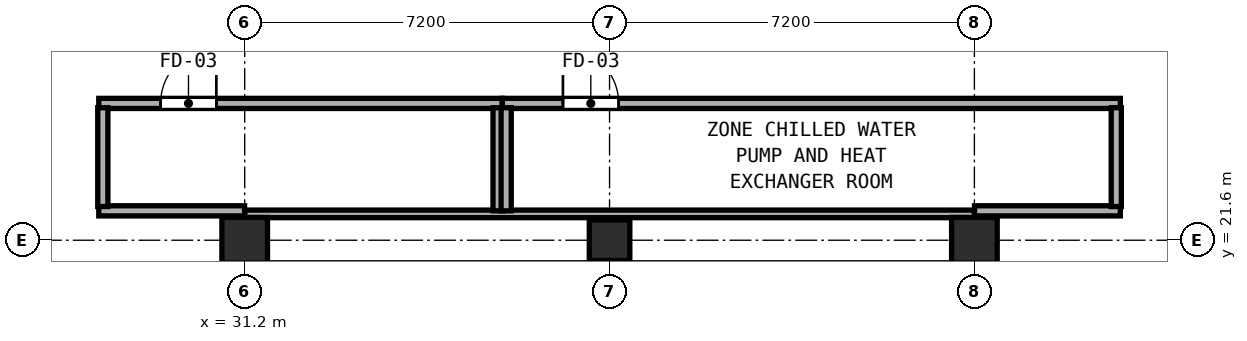
"""IFC4 building model, lengths in metres.
Left out: names, types, materials, properties, quantities, classifications, styles, units other than length and angle.
Written with IfcOpenShell. Run it as: python <this file> out.ifc"""

import sys

from ifc_helpers import new_model, si_unit, direction, frame, frame_2d, origin, origin_2d, place, context, subcontext, project, spatial, rectangle, hollow_rectangle, extrude, element, fill, save


model = new_model("IFC4")
c1 = context("Model", 3, precision=1e-05, world=origin(), true_north=direction((0.0, 1.0)))
c2 = subcontext(c1, "Body", "Model", "MODEL_VIEW")
j1 = project(units=[si_unit("LENGTHUNIT", "METRE"), si_unit("PLANEANGLEUNIT", "RADIAN")], contexts=[c1])
p1 = place(None, origin())
s1 = spatial("IfcSite", under=j1, at=p1, CompositionType="ELEMENT")
p2 = place(p1, origin())
s2 = spatial("IfcBuilding", under=s1, at=p2, CompositionType="ELEMENT")
p3 = place(p2, frame((0.0, 0.0, 230.6)))
s3 = spatial("IfcBuildingStorey", under=s2, at=p3, CompositionType="ELEMENT", Elevation=230.6)
for number, where, z_axis, x_axis in (
    (1, (31.2, 21.6, 0.0), (0.0, 0.0, 1.0), (1.0, 0.0, 0.0)),
    (2, (45.6, 21.6, 0.0), (0.0, 0.0, 1.0), (1.0, 0.0, 0.0)),
):
    element("IfcColumn", number, at=place(p3, frame(where, z_axis=z_axis, x_axis=x_axis)), inside=s3, PredefinedType="COLUMN", context=c2, shape_type="SweptSolid", body=[
        extrude(hollow_rectangle(XDim=0.9, YDim=0.9, WallThickness=0.034, at=origin_2d()), origin(), (0.0, 0.0, 1.0), 4.6),
    ])
p4 = place(p3, frame((38.4, 21.6, 0.0), z_axis=(0.0, 0.0, 1.0), x_axis=(1.0, 0.0, 0.0)))
e3 = element("IfcColumn", 3, at=p4, inside=s3, PredefinedType="COLUMN", context=c2, shape_type="SweptSolid", body=[
    extrude(hollow_rectangle(XDim=0.8, YDim=0.8, WallThickness=0.03, at=origin_2d()), origin(), (0.0, 0.0, 1.0), 4.6),
])
p5 = place(p3, frame((47.987, 20.51, 0.0), z_axis=(0.0, 0.0, 1.0), x_axis=(0.970145687294, 0.242522876086, 0.0)))
e4 = element("IfcWall", 4, at=p5, inside=s3, PredefinedType="PARAPET", context=c2, shape_type="SweptSolid", body=[
    extrude(rectangle(XDim=4.506, YDim=0.16, at=frame_2d((2.253, 0.0))), origin(), (0.0, 0.0, 1.0), 1.15),
])
p6 = place(p3, frame((24.442, 21.603, 0.0), z_axis=(0.0, 0.0, 1.0), x_axis=(0.97014887394, -0.242510128435, 0.0)))
e5 = element("IfcWall", 5, at=p6, inside=s3, PredefinedType="PARAPET", context=c2, shape_type="SweptSolid", body=[
    extrude(rectangle(XDim=4.506, YDim=0.16, at=frame_2d((2.253, 0.0))), origin(), (0.0, 0.0, 1.0), 1.15),
])
p7 = place(p3, frame((31.2, 22.12, 0.0), z_axis=(0.0, 0.0, 1.0), x_axis=(1.0, 0.0, 0.0)))
e6 = element("IfcWall", 6, at=p7, inside=s3, PredefinedType="PARTITIONING", context=c2, shape_type="SweptSolid", body=[
    extrude(rectangle(XDim=14.4, YDim=0.15, at=frame_2d((7.2, 0.0))), origin(), (0.0, 0.0, 1.0), 4.35),
])
p8 = place(p3, frame((28.32, 24.3, 0.0), z_axis=(0.0, 0.0, 1.0), x_axis=(1.0, 0.0, 0.0)))
e7 = element("IfcWall", 7, at=p8, inside=s3, PredefinedType="SOLIDWALL", context=c2, shape_type="SweptSolid", body=[
    extrude(rectangle(XDim=7.96, YDim=0.2, at=frame_2d((3.98, 0.0))), origin(), (0.0, 0.0, 1.0), 4.35),
])
p9 = place(p8, frame((2.321, 0.0, 0.0), z_axis=(0.0, 0.0, 1.0), x_axis=(-1.0, 0.0, 0.0)))
e8 = element("IfcOpeningElement", 8, at=p9, cuts=e7, PredefinedType="OPENING", context=c2, shape_type="SweptSolid", body=[
    extrude(rectangle(XDim=1.1, YDim=2.15, at=frame_2d((0.55, 1.075))), frame((0.0, 0.11, 0.0), z_axis=(0.0, -1.0, 0.0), x_axis=(1.0, 0.0, 0.0)), (0.0, 0.0, 1.0), 0.22),
])
p10 = place(p3, frame((28.32, 22.18, 0.0), z_axis=(0.0, 0.0, 1.0), x_axis=(1.0, 0.0, 0.0)))
e9 = element("IfcWall", 9, at=p10, inside=s3, PredefinedType="SOLIDWALL", context=c2, shape_type="SweptSolid", body=[
    extrude(rectangle(XDim=2.878, YDim=0.2, at=frame_2d((1.439, 0.0))), origin(), (0.0, 0.0, 1.0), 4.35),
])
p11 = place(p3, frame((28.4, 22.265, 0.0), z_axis=(0.0, 0.0, 1.0), x_axis=(0.0, 1.0, 0.0)))
e10 = element("IfcWall", 10, at=p11, inside=s3, PredefinedType="SOLIDWALL", context=c2, shape_type="SweptSolid", body=[
    extrude(rectangle(XDim=1.95, YDim=0.2, at=frame_2d((0.975, 0.0))), origin(), (0.0, 0.0, 1.0), 4.35),
])
p12 = place(p3, frame((36.2, 22.18, 0.0), z_axis=(0.0, 0.0, 1.0), x_axis=(0.0, 1.0, 0.0)))
e11 = element("IfcWall", 11, at=p12, inside=s3, PredefinedType="SOLIDWALL", context=c2, shape_type="SweptSolid", body=[
    extrude(rectangle(XDim=2.035, YDim=0.2, at=frame_2d((1.018, 0.0))), origin(), (0.0, 0.0, 1.0), 4.35),
])
p13 = place(p3, frame((36.285, 24.3, 0.0), z_axis=(0.0, 0.0, 1.0), x_axis=(1.0, 0.0, 0.0)))
e12 = element("IfcWall", 12, at=p13, inside=s3, PredefinedType="SOLIDWALL", context=c2, shape_type="SweptSolid", body=[
    extrude(rectangle(XDim=12.195, YDim=0.2, at=frame_2d((6.098, 0.0))), origin(), (0.0, 0.0, 1.0), 4.35),
])
p14 = place(p13, frame((2.295, 0.0, 0.0), z_axis=(0.0, 0.0, 1.0), x_axis=(-1.0, 0.0, 0.0)))
e13 = element("IfcOpeningElement", 13, at=p14, cuts=e12, PredefinedType="OPENING", context=c2, shape_type="SweptSolid", body=[
    extrude(rectangle(XDim=1.1, YDim=2.15, at=frame_2d((0.55, 1.075))), frame((0.0, 0.11, 0.0), z_axis=(0.0, -1.0, 0.0), x_axis=(1.0, 0.0, 0.0)), (0.0, 0.0, 1.0), 0.22),
])
p15 = place(p3, frame((45.602, 22.18, 0.0), z_axis=(0.0, 0.0, 1.0), x_axis=(1.0, 0.0, 0.0)))
e14 = element("IfcWall", 14, at=p15, inside=s3, PredefinedType="SOLIDWALL", context=c2, shape_type="SweptSolid", body=[
    extrude(rectangle(XDim=2.878, YDim=0.2, at=frame_2d((1.439, 0.0))), origin(), (0.0, 0.0, 1.0), 4.35),
])
p16 = place(p3, frame((36.36, 22.18, 0.0), z_axis=(0.0, 0.0, 1.0), x_axis=(0.0, 1.0, 0.0)))
e15 = element("IfcWall", 15, at=p16, inside=s3, PredefinedType="SOLIDWALL", context=c2, shape_type="SweptSolid", body=[
    extrude(rectangle(XDim=2.035, YDim=0.2, at=frame_2d((1.018, 0.0))), origin(), (0.0, 0.0, 1.0), 4.35),
])
p17 = place(p3, frame((48.4, 22.265, 0.0), z_axis=(0.0, 0.0, 1.0), x_axis=(0.0, 1.0, 0.0)))
e16 = element("IfcWall", 16, at=p17, inside=s3, PredefinedType="SOLIDWALL", context=c2, shape_type="SweptSolid", body=[
    extrude(rectangle(XDim=1.95, YDim=0.2, at=frame_2d((0.975, 0.0))), origin(), (0.0, 0.0, 1.0), 4.35),
])
p18 = place(p9, origin())
e17 = element("IfcDoor", 17, at=p18, inside=s3, OperationType="SINGLE_SWING_LEFT", PredefinedType="DOOR", context=c2, shape_type="SweptSolid", body=[
    extrude(rectangle(XDim=1.1, YDim=2.15, at=frame_2d((0.55, 1.075))), frame((0.0, 0.025, 0.0), z_axis=(0.0, -1.0, 0.0), x_axis=(1.0, 0.0, 0.0)), (0.0, 0.0, 1.0), 0.05),
])
fill(e8, e17)
p19 = place(p14, origin())
e18 = element("IfcDoor", 18, at=p19, inside=s3, OperationType="SINGLE_SWING_RIGHT", PredefinedType="DOOR", context=c2, shape_type="SweptSolid", body=[
    extrude(rectangle(XDim=1.1, YDim=2.15, at=frame_2d((0.55, 1.075))), frame((0.0, 0.025, 0.0), z_axis=(0.0, -1.0, 0.0), x_axis=(1.0, 0.0, 0.0)), (0.0, 0.0, 1.0), 0.05),
])
fill(e13, e18)
save(model, sys.argv[1])
